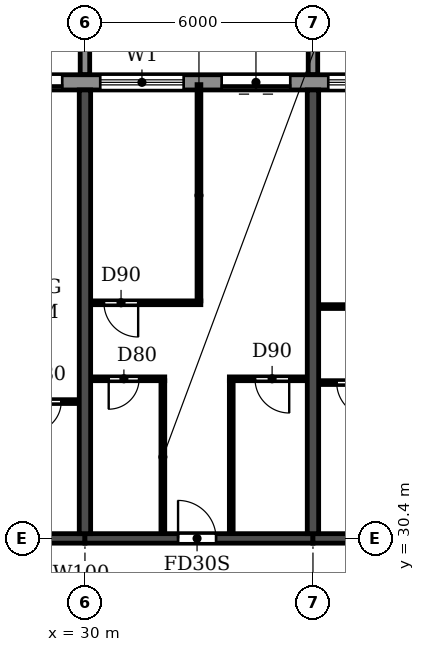
"""IFC4 building model, lengths in metres.
Left out: names, types, materials, properties, quantities, classifications, styles, units other than length and angle.
Written with IfcOpenShell. Run it as: python <this file> out.ifc"""

import sys

from ifc_helpers import new_model, si_unit, direction, frame, frame_2d, origin, place, context, subcontext, project, spatial, polyline, rectangle, outline, extrude, source, transform, mapped, element, fill, save


model = new_model("IFC4")
c1 = context("Model", 3, precision=1e-05, world=origin(), true_north=direction((0.0, 1.0)))
c2 = subcontext(c1, "Body", "Model", "MODEL_VIEW")
j1 = project(units=[si_unit("LENGTHUNIT", "METRE"), si_unit("PLANEANGLEUNIT", "RADIAN")], contexts=[c1])
p1 = place(None, origin())
s1 = spatial("IfcSite", under=j1, at=p1, CompositionType="ELEMENT")
p2 = place(p1, origin())
s2 = spatial("IfcBuilding", under=s1, at=p2, CompositionType="ELEMENT")
p3 = place(p2, frame((0.0, 0.0, 162.0)))
s3 = spatial("IfcBuildingStorey", under=s2, at=p3, CompositionType="ELEMENT", Elevation=162.0)
for number, where, z_axis, x_axis in (
    (1, (30.0, 30.525, 0.0), (0.0, 0.0, 1.0), (0.0, 1.0, 0.0)),
    (2, (36.0, 30.525, 0.0), (0.0, 0.0, 1.0), (0.0, 1.0, 0.0)),
):
    element("IfcWall", number, at=place(p3, frame(where, z_axis=z_axis, x_axis=x_axis)), inside=s3, PredefinedType="SHEAR", context=c2, shape_type="SweptSolid", body=[
        extrude(rectangle(XDim=11.675, YDim=0.3, at=frame_2d((5.837, 0.0))), origin(), (0.0, 0.0, 1.0), 2.95),
    ])
p4 = place(p3, frame((24.0, 30.4, 0.0), z_axis=(0.0, 0.0, 1.0), x_axis=(1.0, 0.0, 0.0)))
e3 = element("IfcWall", 3, at=p4, inside=s3, PredefinedType="SHEAR", context=c2, shape_type="SweptSolid", body=[
    extrude(rectangle(XDim=6.0, YDim=0.25, at=frame_2d((3.0, 0.0))), origin(), (0.0, 0.0, 1.0), 2.35),
])
p5 = place(p4, frame((2.55, 0.0, 0.0)))
e4 = element("IfcOpeningElement", 4, at=p5, cuts=e3, PredefinedType="OPENING", context=c2, shape_type="SweptSolid", body=[
    extrude(rectangle(XDim=1.0, YDim=2.1, at=frame_2d((0.5, 1.05))), frame((0.0, 0.135, 0.0), z_axis=(0.0, -1.0, 0.0), x_axis=(1.0, 0.0, 0.0)), (0.0, 0.0, 1.0), 0.27),
])
p6 = place(p3, frame((30.0, 30.4, 0.0), z_axis=(0.0, 0.0, 1.0), x_axis=(1.0, 0.0, 0.0)))
e5 = element("IfcWall", 5, at=p6, inside=s3, PredefinedType="SHEAR", context=c2, shape_type="SweptSolid", body=[
    extrude(rectangle(XDim=6.0, YDim=0.25, at=frame_2d((3.0, 0.0))), origin(), (0.0, 0.0, 1.0), 2.35),
])
p7 = place(p6, frame((2.45, 0.0, 0.0)))
e6 = element("IfcOpeningElement", 6, at=p7, cuts=e5, PredefinedType="OPENING", context=c2, shape_type="SweptSolid", body=[
    extrude(rectangle(XDim=1.0, YDim=2.1, at=frame_2d((0.5, 1.05))), frame((0.0, 0.135, 0.0), z_axis=(0.0, -1.0, 0.0), x_axis=(1.0, 0.0, 0.0)), (0.0, 0.0, 1.0), 0.27),
])
p8 = place(p3, frame((36.0, 30.4, 0.0), z_axis=(0.0, 0.0, 1.0), x_axis=(1.0, 0.0, 0.0)))
e7 = element("IfcWall", 7, at=p8, inside=s3, PredefinedType="SHEAR", context=c2, shape_type="SweptSolid", body=[
    extrude(rectangle(XDim=6.0, YDim=0.25, at=frame_2d((3.0, 0.0))), origin(), (0.0, 0.0, 1.0), 2.35),
])
p9 = place(p8, frame((2.55, 0.0, 0.0)))
e8 = element("IfcOpeningElement", 8, at=p9, cuts=e7, PredefinedType="OPENING", context=c2, shape_type="SweptSolid", body=[
    extrude(rectangle(XDim=1.0, YDim=2.1, at=frame_2d((0.5, 1.05))), frame((0.0, 0.135, 0.0), z_axis=(0.0, -1.0, 0.0), x_axis=(1.0, 0.0, 0.0)), (0.0, 0.0, 1.0), 0.27),
])
p10 = place(p3, frame((79.317, 42.4, 0.0), z_axis=(0.0, 0.0, 1.0), x_axis=(-1.0, 0.0, 0.0)))
e9 = element("IfcWall", 9, at=p10, inside=s3, PredefinedType="STANDARD", context=c2, shape_type="SweptSolid", body=[
    extrude(rectangle(XDim=56.634, YDim=0.4, at=frame_2d((28.317, 0.0))), origin(), (0.0, 0.0, 1.0), 2.95),
])
p11 = place(p10, frame((52.717, 0.0, 0.9)))
e10 = element("IfcOpeningElement", 10, at=p11, cuts=e9, PredefinedType="OPENING", context=c2, shape_type="SweptSolid", body=[
    extrude(rectangle(XDim=2.2, YDim=1.5, at=frame_2d((1.1, 0.75))), frame((0.0, 0.21, 0.0), z_axis=(0.0, -1.0, 0.0), x_axis=(1.0, 0.0, 0.0)), (0.0, 0.0, 1.0), 0.42),
])
p12 = place(p10, frame((49.917, 0.0, 0.0)))
e11 = element("IfcOpeningElement", 11, at=p12, cuts=e9, PredefinedType="OPENING", context=c2, shape_type="SweptSolid", body=[
    extrude(rectangle(XDim=1.8, YDim=2.4, at=frame_2d((0.9, 1.2))), frame((0.0, 0.21, 0.0), z_axis=(0.0, -1.0, 0.0), x_axis=(1.0, 0.0, 0.0)), (0.0, 0.0, 1.0), 0.42),
])
p13 = place(p10, frame((46.717, 0.0, 0.9)))
e12 = element("IfcOpeningElement", 12, at=p13, cuts=e9, PredefinedType="OPENING", context=c2, shape_type="SweptSolid", body=[
    extrude(rectangle(XDim=2.2, YDim=1.5, at=frame_2d((1.1, 0.75))), frame((0.0, 0.21, 0.0), z_axis=(0.0, -1.0, 0.0), x_axis=(1.0, 0.0, 0.0)), (0.0, 0.0, 1.0), 0.42),
])
p14 = place(p10, frame((43.917, 0.0, 0.0)))
e13 = element("IfcOpeningElement", 13, at=p14, cuts=e9, PredefinedType="OPENING", context=c2, shape_type="SweptSolid", body=[
    extrude(rectangle(XDim=1.8, YDim=2.4, at=frame_2d((0.9, 1.2))), frame((0.0, 0.21, 0.0), z_axis=(0.0, -1.0, 0.0), x_axis=(1.0, 0.0, 0.0)), (0.0, 0.0, 1.0), 0.42),
])
p15 = place(p10, frame((40.717, 0.0, 0.9)))
e14 = element("IfcOpeningElement", 14, at=p15, cuts=e9, PredefinedType="OPENING", context=c2, shape_type="SweptSolid", body=[
    extrude(rectangle(XDim=2.2, YDim=1.5, at=frame_2d((1.1, 0.75))), frame((0.0, 0.21, 0.0), z_axis=(0.0, -1.0, 0.0), x_axis=(1.0, 0.0, 0.0)), (0.0, 0.0, 1.0), 0.42),
])
p16 = place(p10, frame((37.917, 0.0, 0.0)))
e15 = element("IfcOpeningElement", 15, at=p16, cuts=e9, PredefinedType="OPENING", context=c2, shape_type="SweptSolid", body=[
    extrude(rectangle(XDim=1.8, YDim=2.4, at=frame_2d((0.9, 1.2))), frame((0.0, 0.21, 0.0), z_axis=(0.0, -1.0, 0.0), x_axis=(1.0, 0.0, 0.0)), (0.0, 0.0, 1.0), 0.42),
])
p17 = place(p10, frame((34.717, 0.0, 0.9)))
e16 = element("IfcOpeningElement", 16, at=p17, cuts=e9, PredefinedType="OPENING", context=c2, shape_type="SweptSolid", body=[
    extrude(rectangle(XDim=2.2, YDim=1.5, at=frame_2d((1.1, 0.75))), frame((0.0, 0.21, 0.0), z_axis=(0.0, -1.0, 0.0), x_axis=(1.0, 0.0, 0.0)), (0.0, 0.0, 1.0), 0.42),
])
p18 = place(p10, frame((31.717, 0.0, 0.9)))
e17 = element("IfcOpeningElement", 17, at=p18, cuts=e9, PredefinedType="OPENING", context=c2, shape_type="SweptSolid", body=[
    extrude(rectangle(XDim=2.2, YDim=1.5, at=frame_2d((1.1, 0.75))), frame((0.0, 0.21, 0.0), z_axis=(0.0, -1.0, 0.0), x_axis=(1.0, 0.0, 0.0)), (0.0, 0.0, 1.0), 0.42),
])
p19 = place(p10, frame((28.717, 0.0, 0.9)))
e18 = element("IfcOpeningElement", 18, at=p19, cuts=e9, PredefinedType="OPENING", context=c2, shape_type="SweptSolid", body=[
    extrude(rectangle(XDim=2.2, YDim=1.5, at=frame_2d((1.1, 0.75))), frame((0.0, 0.21, 0.0), z_axis=(0.0, -1.0, 0.0), x_axis=(1.0, 0.0, 0.0)), (0.0, 0.0, 1.0), 0.42),
])
p20 = place(p10, frame((25.717, 0.0, 0.9)))
e19 = element("IfcOpeningElement", 19, at=p20, cuts=e9, PredefinedType="OPENING", context=c2, shape_type="SweptSolid", body=[
    extrude(rectangle(XDim=2.2, YDim=1.5, at=frame_2d((1.1, 0.75))), frame((0.0, 0.21, 0.0), z_axis=(0.0, -1.0, 0.0), x_axis=(1.0, 0.0, 0.0)), (0.0, 0.0, 1.0), 0.42),
])
p21 = place(p10, frame((22.717, 0.0, 0.9)))
e20 = element("IfcOpeningElement", 20, at=p21, cuts=e9, PredefinedType="OPENING", context=c2, shape_type="SweptSolid", body=[
    extrude(rectangle(XDim=2.2, YDim=1.5, at=frame_2d((1.1, 0.75))), frame((0.0, 0.21, 0.0), z_axis=(0.0, -1.0, 0.0), x_axis=(1.0, 0.0, 0.0)), (0.0, 0.0, 1.0), 0.42),
])
p22 = place(p10, frame((19.917, 0.0, 0.0)))
e21 = element("IfcOpeningElement", 21, at=p22, cuts=e9, PredefinedType="OPENING", context=c2, shape_type="SweptSolid", body=[
    extrude(rectangle(XDim=1.8, YDim=2.4, at=frame_2d((0.9, 1.2))), frame((0.0, 0.21, 0.0), z_axis=(0.0, -1.0, 0.0), x_axis=(1.0, 0.0, 0.0)), (0.0, 0.0, 1.0), 0.42),
])
p23 = place(p10, frame((16.717, 0.0, 0.9)))
e22 = element("IfcOpeningElement", 22, at=p23, cuts=e9, PredefinedType="OPENING", context=c2, shape_type="SweptSolid", body=[
    extrude(rectangle(XDim=2.2, YDim=1.5, at=frame_2d((1.1, 0.75))), frame((0.0, 0.21, 0.0), z_axis=(0.0, -1.0, 0.0), x_axis=(1.0, 0.0, 0.0)), (0.0, 0.0, 1.0), 0.42),
])
p24 = place(p10, frame((13.717, 0.0, 0.9)))
e23 = element("IfcOpeningElement", 23, at=p24, cuts=e9, PredefinedType="OPENING", context=c2, shape_type="SweptSolid", body=[
    extrude(rectangle(XDim=2.2, YDim=1.5, at=frame_2d((1.1, 0.75))), frame((0.0, 0.21, 0.0), z_axis=(0.0, -1.0, 0.0), x_axis=(1.0, 0.0, 0.0)), (0.0, 0.0, 1.0), 0.42),
])
p25 = place(p10, frame((10.717, 0.0, 0.9)))
e24 = element("IfcOpeningElement", 24, at=p25, cuts=e9, PredefinedType="OPENING", context=c2, shape_type="SweptSolid", body=[
    extrude(rectangle(XDim=2.2, YDim=1.5, at=frame_2d((1.1, 0.75))), frame((0.0, 0.21, 0.0), z_axis=(0.0, -1.0, 0.0), x_axis=(1.0, 0.0, 0.0)), (0.0, 0.0, 1.0), 0.42),
])
p26 = place(p10, frame((7.917, 0.0, 0.0)))
e25 = element("IfcOpeningElement", 25, at=p26, cuts=e9, PredefinedType="OPENING", context=c2, shape_type="SweptSolid", body=[
    extrude(rectangle(XDim=1.8, YDim=2.4, at=frame_2d((0.9, 1.2))), frame((0.0, 0.21, 0.0), z_axis=(0.0, -1.0, 0.0), x_axis=(1.0, 0.0, 0.0)), (0.0, 0.0, 1.0), 0.42),
])
p27 = place(p10, frame((4.717, 0.0, 0.9)))
e26 = element("IfcOpeningElement", 26, at=p27, cuts=e9, PredefinedType="OPENING", context=c2, shape_type="SweptSolid", body=[
    extrude(rectangle(XDim=2.2, YDim=1.5, at=frame_2d((1.1, 0.75))), frame((0.0, 0.21, 0.0), z_axis=(0.0, -1.0, 0.0), x_axis=(1.0, 0.0, 0.0)), (0.0, 0.0, 1.0), 0.42),
])
p28 = place(p10, frame((1.917, 0.0, 0.0)))
e27 = element("IfcOpeningElement", 27, at=p28, cuts=e9, PredefinedType="OPENING", context=c2, shape_type="SweptSolid", body=[
    extrude(rectangle(XDim=1.8, YDim=2.4, at=frame_2d((0.9, 1.2))), frame((0.0, 0.21, 0.0), z_axis=(0.0, -1.0, 0.0), x_axis=(1.0, 0.0, 0.0)), (0.0, 0.0, 1.0), 0.42),
])
m1 = source(origin(), c2, "Body", "SweptSolid", [
    extrude(outline(polyline([(0.0, 0.0), (0.25, 0.0), (0.25, 3.1), (0.0, 3.1), (0.0, 0.0)])), origin(), (0.0, 0.0, 1.0), 3.1),
])
for number, where in (
    (28, (29.875, 42.6, 0.0)),
    (29, (35.875, 42.6, 0.0)),
):
    element("IfcWall", number, at=place(p3, frame(where)), inside=s3, PredefinedType="STANDARD", context=c2, shape_type="MappedRepresentation", body=[
        mapped(m1, transform((0.0, 0.0, 0.0))),
    ])
p29 = place(p3, frame((27.9, 34.0, 0.0), z_axis=(0.0, 0.0, 1.0), x_axis=(1.0, 0.0, 0.0)))
e30 = element("IfcWall", 30, at=p29, inside=s3, PredefinedType="PARTITIONING", context=c2, shape_type="SweptSolid", body=[
    extrude(rectangle(XDim=1.94, YDim=0.1, at=frame_2d((0.97, 0.0))), origin(), (0.0, 0.0, 1.0), 2.95),
])
p30 = place(p29, frame((0.675, 0.0, 0.0)))
e31 = element("IfcOpeningElement", 31, at=p30, cuts=e30, PredefinedType="OPENING", context=c2, shape_type="SweptSolid", body=[
    extrude(rectangle(XDim=0.8, YDim=2.1, at=frame_2d((0.4, 1.05))), frame((0.0, 0.06, 0.0), z_axis=(0.0, -1.0, 0.0), x_axis=(1.0, 0.0, 0.0)), (0.0, 0.0, 1.0), 0.12),
])
p31 = place(p3, frame((36.16, 34.5, 0.0), z_axis=(0.0, 0.0, 1.0), x_axis=(1.0, 0.0, 0.0)))
e32 = element("IfcWall", 32, at=p31, inside=s3, PredefinedType="PARTITIONING", context=c2, shape_type="SweptSolid", body=[
    extrude(rectangle(XDim=2.04, YDim=0.1, at=frame_2d((1.02, 0.0))), origin(), (0.0, 0.0, 1.0), 2.95),
])
p32 = place(p31, frame((0.465, 0.0, 0.0)))
e33 = element("IfcOpeningElement", 33, at=p32, cuts=e32, PredefinedType="OPENING", context=c2, shape_type="SweptSolid", body=[
    extrude(rectangle(XDim=0.9, YDim=2.1, at=frame_2d((0.45, 1.05))), frame((0.0, 0.06, 0.0), z_axis=(0.0, -1.0, 0.0), x_axis=(1.0, 0.0, 0.0)), (0.0, 0.0, 1.0), 0.12),
])
p33 = place(p3, frame((30.16, 34.6, 0.0), z_axis=(0.0, 0.0, 1.0), x_axis=(1.0, 0.0, 0.0)))
e34 = element("IfcWall", 34, at=p33, inside=s3, PredefinedType="PARTITIONING", context=c2, shape_type="SweptSolid", body=[
    extrude(rectangle(XDim=1.94, YDim=0.1, at=frame_2d((0.97, 0.0))), origin(), (0.0, 0.0, 1.0), 2.95),
])
p34 = place(p33, frame((0.465, 0.0, 0.0)))
e35 = element("IfcOpeningElement", 35, at=p34, cuts=e34, PredefinedType="OPENING", context=c2, shape_type="SweptSolid", body=[
    extrude(rectangle(XDim=0.8, YDim=2.1, at=frame_2d((0.4, 1.05))), frame((0.0, 0.06, 0.0), z_axis=(0.0, -1.0, 0.0), x_axis=(1.0, 0.0, 0.0)), (0.0, 0.0, 1.0), 0.12),
])
p35 = place(p3, frame((33.8, 34.6, 0.0), z_axis=(0.0, 0.0, 1.0), x_axis=(1.0, 0.0, 0.0)))
e36 = element("IfcWall", 36, at=p35, inside=s3, PredefinedType="PARTITIONING", context=c2, shape_type="SweptSolid", body=[
    extrude(rectangle(XDim=2.04, YDim=0.1, at=frame_2d((1.02, 0.0))), origin(), (0.0, 0.0, 1.0), 2.95),
])
p36 = place(p35, frame((0.675, 0.0, 0.0)))
e37 = element("IfcOpeningElement", 37, at=p36, cuts=e36, PredefinedType="OPENING", context=c2, shape_type="SweptSolid", body=[
    extrude(rectangle(XDim=0.9, YDim=2.1, at=frame_2d((0.45, 1.05))), frame((0.0, 0.06, 0.0), z_axis=(0.0, -1.0, 0.0), x_axis=(1.0, 0.0, 0.0)), (0.0, 0.0, 1.0), 0.12),
])
p37 = place(p3, frame((36.16, 36.5, 0.0), z_axis=(0.0, 0.0, 1.0), x_axis=(1.0, 0.0, 0.0)))
e38 = element("IfcWall", 38, at=p37, inside=s3, PredefinedType="PARTITIONING", context=c2, shape_type="SweptSolid", body=[
    extrude(rectangle(XDim=2.89, YDim=0.1, at=frame_2d((1.445, 0.0))), origin(), (0.0, 0.0, 1.0), 2.95),
])
p38 = place(p37, frame((1.44, 0.0, 0.0)))
e39 = element("IfcOpeningElement", 39, at=p38, cuts=e38, PredefinedType="OPENING", context=c2, shape_type="SweptSolid", body=[
    extrude(rectangle(XDim=0.9, YDim=2.1, at=frame_2d((0.45, 1.05))), frame((0.0, 0.06, 0.0), z_axis=(0.0, -1.0, 0.0), x_axis=(1.0, 0.0, 0.0)), (0.0, 0.0, 1.0), 0.12),
])
p39 = place(p3, frame((30.16, 36.6, 0.0), z_axis=(0.0, 0.0, 1.0), x_axis=(1.0, 0.0, 0.0)))
e40 = element("IfcWall", 40, at=p39, inside=s3, PredefinedType="PARTITIONING", context=c2, shape_type="SweptSolid", body=[
    extrude(rectangle(XDim=2.89, YDim=0.1, at=frame_2d((1.445, 0.0))), origin(), (0.0, 0.0, 1.0), 2.95),
])
p40 = place(p39, frame((0.34, 0.0, 0.0)))
e41 = element("IfcOpeningElement", 41, at=p40, cuts=e40, PredefinedType="OPENING", context=c2, shape_type="SweptSolid", body=[
    extrude(rectangle(XDim=0.9, YDim=2.1, at=frame_2d((0.45, 1.05))), frame((0.0, 0.06, 0.0), z_axis=(0.0, -1.0, 0.0), x_axis=(1.0, 0.0, 0.0)), (0.0, 0.0, 1.0), 0.12),
])
p41 = place(p3, frame((32.05, 30.535, 0.0), z_axis=(0.0, 0.0, 1.0), x_axis=(0.0, 1.0, 0.0)))
e42 = element("IfcWall", 42, at=p41, inside=s3, PredefinedType="PARTITIONING", context=c2, shape_type="SweptSolid", body=[
    extrude(rectangle(XDim=4.015, YDim=0.1, at=frame_2d((2.008, 0.0))), origin(), (0.0, 0.0, 1.0), 2.95),
])
p42 = place(p3, frame((33.0, 36.65, 0.0), z_axis=(0.0, 0.0, 1.0), x_axis=(0.0, 1.0, 0.0)))
e43 = element("IfcWall", 43, at=p42, inside=s3, PredefinedType="PARTITIONING", context=c2, shape_type="SweptSolid", body=[
    extrude(rectangle(XDim=5.69, YDim=0.1, at=frame_2d((2.845, 0.0))), origin(), (0.0, 0.0, 1.0), 2.95),
])
p43 = place(p3, frame((33.85, 30.535, 0.0), z_axis=(0.0, 0.0, 1.0), x_axis=(0.0, 1.0, 0.0)))
e44 = element("IfcWall", 44, at=p43, inside=s3, PredefinedType="PARTITIONING", context=c2, shape_type="SweptSolid", body=[
    extrude(rectangle(XDim=4.015, YDim=0.1, at=frame_2d((2.008, 0.0))), origin(), (0.0, 0.0, 1.0), 2.95),
])
p44 = place(p12, origin())
e45 = element("IfcDoor", 45, at=p44, inside=s3, OperationType="DOUBLE_DOOR_SLIDING", PredefinedType="DOOR", context=c2, shape_type="SweptSolid", body=[
    extrude(rectangle(XDim=1.8, YDim=2.4, at=frame_2d((0.9, 1.2))), frame((0.0, 0.025, 0.0), z_axis=(0.0, -1.0, 0.0), x_axis=(1.0, 0.0, 0.0)), (0.0, 0.0, 1.0), 0.05),
])
fill(e11, e45)
p45 = place(p13, origin())
e46 = element("IfcWindow", 46, at=p45, inside=s3, PartitioningType="DOUBLE_PANEL_HORIZONTAL", PredefinedType="WINDOW", context=c2, shape_type="SweptSolid", body=[
    extrude(rectangle(XDim=2.2, YDim=1.5, at=frame_2d((1.1, 0.75))), frame((0.0, 0.03, 0.0), z_axis=(0.0, -1.0, 0.0), x_axis=(1.0, 0.0, 0.0)), (0.0, 0.0, 1.0), 0.06),
])
fill(e12, e46)
p46 = place(p14, origin())
e47 = element("IfcDoor", 47, at=p46, inside=s3, OperationType="DOUBLE_DOOR_SLIDING", PredefinedType="DOOR", context=c2, shape_type="SweptSolid", body=[
    extrude(rectangle(XDim=1.8, YDim=2.4, at=frame_2d((0.9, 1.2))), frame((0.0, 0.025, 0.0), z_axis=(0.0, -1.0, 0.0), x_axis=(1.0, 0.0, 0.0)), (0.0, 0.0, 1.0), 0.05),
])
fill(e13, e47)
p47 = place(p15, origin())
e48 = element("IfcWindow", 48, at=p47, inside=s3, PartitioningType="DOUBLE_PANEL_HORIZONTAL", PredefinedType="WINDOW", context=c2, shape_type="SweptSolid", body=[
    extrude(rectangle(XDim=2.2, YDim=1.5, at=frame_2d((1.1, 0.75))), frame((0.0, 0.03, 0.0), z_axis=(0.0, -1.0, 0.0), x_axis=(1.0, 0.0, 0.0)), (0.0, 0.0, 1.0), 0.06),
])
fill(e14, e48)
p48 = place(p30, frame((0.8, 0.0, 0.0), z_axis=(0.0, 0.0, 1.0), x_axis=(-1.0, 0.0, 0.0)))
e49 = element("IfcDoor", 49, at=p48, inside=s3, OperationType="SINGLE_SWING_RIGHT", PredefinedType="DOOR", context=c2, shape_type="SweptSolid", body=[
    extrude(rectangle(XDim=0.8, YDim=2.1, at=frame_2d((0.4, 1.05))), frame((0.0, 0.025, 0.0), z_axis=(0.0, -1.0, 0.0), x_axis=(1.0, 0.0, 0.0)), (0.0, 0.0, 1.0), 0.05),
])
fill(e31, e49)
p49 = place(p40, frame((0.9, 0.0, 0.0), z_axis=(0.0, 0.0, 1.0), x_axis=(-1.0, 0.0, 0.0)))
e50 = element("IfcDoor", 50, at=p49, inside=s3, OperationType="SINGLE_SWING_LEFT", PredefinedType="DOOR", context=c2, shape_type="SweptSolid", body=[
    extrude(rectangle(XDim=0.9, YDim=2.1, at=frame_2d((0.45, 1.05))), frame((0.0, 0.025, 0.0), z_axis=(0.0, -1.0, 0.0), x_axis=(1.0, 0.0, 0.0)), (0.0, 0.0, 1.0), 0.05),
])
fill(e41, e50)
p50 = place(p34, frame((0.8, 0.0, 0.0), z_axis=(0.0, 0.0, 1.0), x_axis=(-1.0, 0.0, 0.0)))
e51 = element("IfcDoor", 51, at=p50, inside=s3, OperationType="SINGLE_SWING_RIGHT", PredefinedType="DOOR", context=c2, shape_type="SweptSolid", body=[
    extrude(rectangle(XDim=0.8, YDim=2.1, at=frame_2d((0.4, 1.05))), frame((0.0, 0.025, 0.0), z_axis=(0.0, -1.0, 0.0), x_axis=(1.0, 0.0, 0.0)), (0.0, 0.0, 1.0), 0.05),
])
fill(e35, e51)
p51 = place(p7, origin())
e52 = element("IfcDoor", 52, at=p51, inside=s3, OperationType="SINGLE_SWING_LEFT", PredefinedType="DOOR", context=c2, shape_type="SweptSolid", body=[
    extrude(rectangle(XDim=1.0, YDim=2.1, at=frame_2d((0.5, 1.05))), frame((0.0, 0.025, 0.0), z_axis=(0.0, -1.0, 0.0), x_axis=(1.0, 0.0, 0.0)), (0.0, 0.0, 1.0), 0.05),
])
fill(e6, e52)
p52 = place(p36, frame((0.9, 0.0, 0.0), z_axis=(0.0, 0.0, 1.0), x_axis=(-1.0, 0.0, 0.0)))
e53 = element("IfcDoor", 53, at=p52, inside=s3, OperationType="SINGLE_SWING_LEFT", PredefinedType="DOOR", context=c2, shape_type="SweptSolid", body=[
    extrude(rectangle(XDim=0.9, YDim=2.1, at=frame_2d((0.45, 1.05))), frame((0.0, 0.025, 0.0), z_axis=(0.0, -1.0, 0.0), x_axis=(1.0, 0.0, 0.0)), (0.0, 0.0, 1.0), 0.05),
])
fill(e37, e53)
p53 = place(p32, frame((0.9, 0.0, 0.0), z_axis=(0.0, 0.0, 1.0), x_axis=(-1.0, 0.0, 0.0)))
e54 = element("IfcDoor", 54, at=p53, inside=s3, OperationType="SINGLE_SWING_LEFT", PredefinedType="DOOR", context=c2, shape_type="SweptSolid", body=[
    extrude(rectangle(XDim=0.9, YDim=2.1, at=frame_2d((0.45, 1.05))), frame((0.0, 0.025, 0.0), z_axis=(0.0, -1.0, 0.0), x_axis=(1.0, 0.0, 0.0)), (0.0, 0.0, 1.0), 0.05),
])
fill(e33, e54)
save(model, sys.argv[1])
